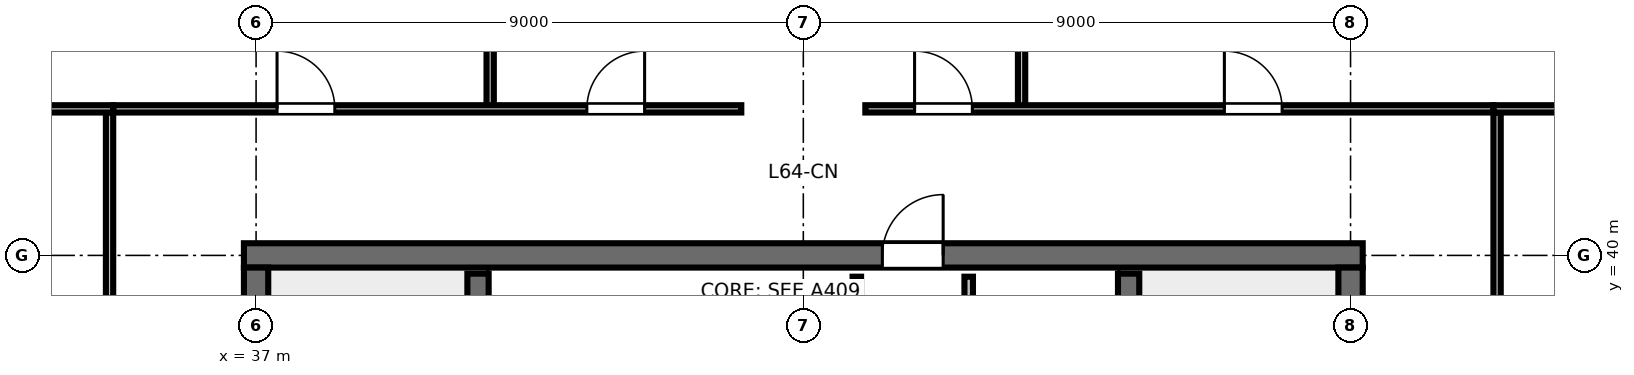
"""IFC4 building model, lengths in metres.
Left out: names, types, materials, properties, quantities, classifications, styles, units other than length and angle.
Written with IfcOpenShell. Run it as: python <this file> out.ifc"""

import sys

from ifc_helpers import new_model, si_unit, direction, frame, frame_2d, origin, place, context, subcontext, project, spatial, rectangle, extrude, element, fill, save


model = new_model("IFC4")
c1 = context("Model", 3, precision=1e-05, world=origin(), true_north=direction((0.0, 1.0)))
c2 = subcontext(c1, "Body", "Model", "MODEL_VIEW")
j1 = project(units=[si_unit("LENGTHUNIT", "METRE"), si_unit("PLANEANGLEUNIT", "RADIAN")], contexts=[c1])
p1 = place(None, origin())
s1 = spatial("IfcSite", under=j1, at=p1, CompositionType="ELEMENT")
p2 = place(p1, origin())
s2 = spatial("IfcBuilding", under=s1, at=p2, CompositionType="ELEMENT")
p3 = place(p2, frame((0.0, 0.0, 243.0)))
s3 = spatial("IfcBuildingStorey", under=s2, at=p3, CompositionType="ELEMENT", Elevation=243.0)
p4 = place(p3, frame((36.8, 40.0, 0.0), z_axis=(0.0, 0.0, 1.0), x_axis=(1.0, 0.0, 0.0)))
e1 = element("IfcWall", 1, at=p4, inside=s3, PredefinedType="SHEAR", context=c2, shape_type="SweptSolid", body=[
    extrude(rectangle(XDim=18.4, YDim=0.4, at=frame_2d((9.2, 0.0))), origin(), (0.0, 0.0, 1.0), 3.36),
])
p5 = place(p4, frame((10.5, 0.0, 0.0)))
e2 = element("IfcOpeningElement", 2, at=p5, cuts=e1, PredefinedType="OPENING", context=c2, shape_type="SweptSolid", body=[
    extrude(rectangle(XDim=1.0, YDim=2.15, at=frame_2d((0.5, 1.075))), frame((0.0, 0.21, 0.0), z_axis=(0.0, -1.0, 0.0), x_axis=(1.0, 0.0, 0.0)), (0.0, 0.0, 1.0), 0.42),
])
p6 = place(p3, frame((37.0, 24.2, 0.0), z_axis=(0.0, 0.0, 1.0), x_axis=(0.0, 1.0, 0.0)))
e3 = element("IfcWall", 3, at=p6, inside=s3, PredefinedType="SHEAR", context=c2, shape_type="SweptSolid", body=[
    extrude(rectangle(XDim=15.6, YDim=0.4, at=frame_2d((7.8, 0.0))), origin(), (0.0, 0.0, 1.0), 3.36),
])
p7 = place(p6, frame((5.325, 0.0, 0.0)))
e4 = element("IfcOpeningElement", 4, at=p7, cuts=e3, PredefinedType="OPENING", context=c2, shape_type="SweptSolid", body=[
    extrude(rectangle(XDim=1.15, YDim=2.15, at=frame_2d((0.575, 1.075))), frame((0.0, 0.21, 0.0), z_axis=(0.0, -1.0, 0.0), x_axis=(1.0, 0.0, 0.0)), (0.0, 0.0, 1.0), 0.42),
])
p8 = place(p3, frame((55.0, 24.2, 0.0), z_axis=(0.0, 0.0, 1.0), x_axis=(0.0, 1.0, 0.0)))
e5 = element("IfcWall", 5, at=p8, inside=s3, PredefinedType="SHEAR", context=c2, shape_type="SweptSolid", body=[
    extrude(rectangle(XDim=15.6, YDim=0.4, at=frame_2d((7.8, 0.0))), origin(), (0.0, 0.0, 1.0), 3.36),
])
p9 = place(p8, frame((5.325, 0.0, 0.0)))
e6 = element("IfcOpeningElement", 6, at=p9, cuts=e5, PredefinedType="OPENING", context=c2, shape_type="SweptSolid", body=[
    extrude(rectangle(XDim=1.15, YDim=2.15, at=frame_2d((0.575, 1.075))), frame((0.0, 0.21, 0.0), z_axis=(0.0, -1.0, 0.0), x_axis=(1.0, 0.0, 0.0)), (0.0, 0.0, 1.0), 0.42),
])
for number, where, z_axis, x_axis in (
    (7, (65.144, 41.854, 0.0), (0.0, 0.0, 1.0), (-0.707, 0.707, 0.0)),
    (8, (34.396, 49.394, 0.0), (0.0, 0.0, 1.0), (-0.707, -0.707, 0.0)),
):
    element("IfcWall", number, at=place(p3, frame(where, z_axis=z_axis, x_axis=x_axis)), inside=s3, PredefinedType="STANDARD", context=c2, shape_type="SweptSolid", body=[
        extrude(rectangle(XDim=10.662, YDim=0.265, at=frame_2d((5.331, 0.0))), origin(), (0.0, 0.0, 1.0), 3.375),
    ])
for number, where, z_axis, x_axis in (
    (9, (40.65, 32.0, 0.0), (0.0, 0.0, 1.0), (0.0, 1.0, 0.0)),
    (10, (51.35, 32.0, 0.0), (0.0, 0.0, 1.0), (0.0, 1.0, 0.0)),
):
    element("IfcWall", number, at=place(p3, frame(where, z_axis=z_axis, x_axis=x_axis)), inside=s3, PredefinedType="SHEAR", context=c2, shape_type="SweptSolid", body=[
        extrude(rectangle(XDim=7.7, YDim=0.35, at=frame_2d((3.85, 0.0))), origin(), (0.0, 0.0, 1.0), 3.6),
    ])
p10 = place(p3, frame((46.88, 32.05, 0.0), z_axis=(0.0, 0.0, 1.0), x_axis=(0.0, 1.0, 0.0)))
e11 = element("IfcWall", 11, at=p10, inside=s3, PredefinedType="PARTITIONING", context=c2, shape_type="SweptSolid", body=[
    extrude(rectangle(XDim=7.6, YDim=0.14, at=frame_2d((3.8, 0.0))), origin(), (0.0, 0.0, 1.0), 3.375),
])
p11 = place(p10, frame((3.4, 0.0, 0.0)))
e12 = element("IfcOpeningElement", 12, at=p11, cuts=e11, PredefinedType="OPENING", context=c2, shape_type="SweptSolid", body=[
    extrude(rectangle(XDim=0.95, YDim=2.15, at=frame_2d((0.475, 1.075))), frame((0.0, 0.08, 0.0), z_axis=(0.0, -1.0, 0.0), x_axis=(1.0, 0.0, 0.0)), (0.0, 0.0, 1.0), 0.16),
])
p12 = place(p3, frame((48.72, 32.05, 0.0), z_axis=(0.0, 0.0, 1.0), x_axis=(0.0, 1.0, 0.0)))
e13 = element("IfcWall", 13, at=p12, inside=s3, PredefinedType="PARTITIONING", context=c2, shape_type="SweptSolid", body=[
    extrude(rectangle(XDim=7.6, YDim=0.14, at=frame_2d((3.8, 0.0))), origin(), (0.0, 0.0, 1.0), 3.375),
])
p13 = place(p12, frame((0.8, 0.0, 0.0)))
e14 = element("IfcOpeningElement", 14, at=p13, cuts=e13, PredefinedType="OPENING", context=c2, shape_type="SweptSolid", body=[
    extrude(rectangle(XDim=0.9, YDim=2.15, at=frame_2d((0.45, 1.075))), frame((0.0, 0.08, 0.0), z_axis=(0.0, -1.0, 0.0), x_axis=(1.0, 0.0, 0.0)), (0.0, 0.0, 1.0), 0.16),
])
p14 = place(p12, frame((3.35, 0.0, 0.0)))
e15 = element("IfcOpeningElement", 15, at=p14, cuts=e13, PredefinedType="OPENING", context=c2, shape_type="SweptSolid", body=[
    extrude(rectangle(XDim=0.9, YDim=2.15, at=frame_2d((0.45, 1.075))), frame((0.0, 0.08, 0.0), z_axis=(0.0, -1.0, 0.0), x_axis=(1.0, 0.0, 0.0)), (0.0, 0.0, 1.0), 0.16),
])
p15 = place(p12, frame((5.9, 0.0, 0.0)))
e16 = element("IfcOpeningElement", 16, at=p15, cuts=e13, PredefinedType="OPENING", context=c2, shape_type="SweptSolid", body=[
    extrude(rectangle(XDim=0.92, YDim=2.15, at=frame_2d((0.46, 1.075))), frame((0.0, 0.08, 0.0), z_axis=(0.0, -1.0, 0.0), x_axis=(1.0, 0.0, 0.0)), (0.0, 0.0, 1.0), 0.16),
])
p16 = place(p3, frame((40.85, 42.41, 0.0), z_axis=(0.0, 0.0, 1.0), x_axis=(0.0, 1.0, 0.0)))
e17 = element("IfcWall", 17, at=p16, inside=s3, PredefinedType="PARTITIONING", context=c2, shape_type="SweptSolid", body=[
    extrude(rectangle(XDim=6.41, YDim=0.12, at=frame_2d((3.205, 0.0))), origin(), (0.0, 0.0, 1.0), 2.655),
])
p17 = place(p16, frame((1.4, 0.0, 0.0)))
e18 = element("IfcOpeningElement", 18, at=p17, cuts=e17, PredefinedType="OPENING", context=c2, shape_type="SweptSolid", body=[
    extrude(rectangle(XDim=0.9, YDim=2.15, at=frame_2d((0.45, 1.075))), frame((0.0, 0.07, 0.0), z_axis=(0.0, -1.0, 0.0), x_axis=(1.0, 0.0, 0.0)), (0.0, 0.0, 1.0), 0.14),
])
p18 = place(p3, frame((49.59, 42.41, 0.0), z_axis=(0.0, 0.0, 1.0), x_axis=(0.0, 1.0, 0.0)))
e19 = element("IfcWall", 19, at=p18, inside=s3, PredefinedType="PARTITIONING", context=c2, shape_type="SweptSolid", body=[
    extrude(rectangle(XDim=6.41, YDim=0.12, at=frame_2d((3.205, 0.0))), origin(), (0.0, 0.0, 1.0), 2.655),
])
p19 = place(p18, frame((1.4, 0.0, 0.0)))
e20 = element("IfcOpeningElement", 20, at=p19, cuts=e19, PredefinedType="OPENING", context=c2, shape_type="SweptSolid", body=[
    extrude(rectangle(XDim=0.9, YDim=2.15, at=frame_2d((0.45, 1.075))), frame((0.0, 0.07, 0.0), z_axis=(0.0, -1.0, 0.0), x_axis=(1.0, 0.0, 0.0)), (0.0, 0.0, 1.0), 0.14),
])
p20 = place(p3, frame((34.65, 42.41, 0.0), z_axis=(0.0, 0.0, 1.0), x_axis=(1.0, 0.0, 0.0)))
e21 = element("IfcWall", 21, at=p20, inside=s3, PredefinedType="PARTITIONING", context=c2, shape_type="SweptSolid", body=[
    extrude(rectangle(XDim=10.33, YDim=0.12, at=frame_2d((5.165, 0.0))), origin(), (0.0, 0.0, 1.0), 2.655),
])
p21 = place(p20, frame((2.695, 0.0, 0.0)))
e22 = element("IfcOpeningElement", 22, at=p21, cuts=e21, PredefinedType="OPENING", context=c2, shape_type="SweptSolid", body=[
    extrude(rectangle(XDim=0.95, YDim=2.15, at=frame_2d((0.475, 1.075))), frame((0.0, 0.07, 0.0), z_axis=(0.0, -1.0, 0.0), x_axis=(1.0, 0.0, 0.0)), (0.0, 0.0, 1.0), 0.14),
])
p22 = place(p20, frame((7.79, 0.0, 0.0)))
e23 = element("IfcOpeningElement", 23, at=p22, cuts=e21, PredefinedType="OPENING", context=c2, shape_type="SweptSolid", body=[
    extrude(rectangle(XDim=0.95, YDim=2.15, at=frame_2d((0.475, 1.075))), frame((0.0, 0.07, 0.0), z_axis=(0.0, -1.0, 0.0), x_axis=(1.0, 0.0, 0.0)), (0.0, 0.0, 1.0), 0.14),
])
p23 = place(p3, frame((47.02, 42.41, 0.0), z_axis=(0.0, 0.0, 1.0), x_axis=(1.0, 0.0, 0.0)))
e24 = element("IfcWall", 24, at=p23, inside=s3, PredefinedType="PARTITIONING", context=c2, shape_type="SweptSolid", body=[
    extrude(rectangle(XDim=10.33, YDim=0.12, at=frame_2d((5.165, 0.0))), origin(), (0.0, 0.0, 1.0), 2.655),
])
p24 = place(p23, frame((0.81, 0.0, 0.0)))
e25 = element("IfcOpeningElement", 25, at=p24, cuts=e24, PredefinedType="OPENING", context=c2, shape_type="SweptSolid", body=[
    extrude(rectangle(XDim=0.95, YDim=2.15, at=frame_2d((0.475, 1.075))), frame((0.0, 0.07, 0.0), z_axis=(0.0, -1.0, 0.0), x_axis=(1.0, 0.0, 0.0)), (0.0, 0.0, 1.0), 0.14),
])
p25 = place(p23, frame((5.905, 0.0, 0.0)))
e26 = element("IfcOpeningElement", 26, at=p25, cuts=e24, PredefinedType="OPENING", context=c2, shape_type="SweptSolid", body=[
    extrude(rectangle(XDim=0.95, YDim=2.15, at=frame_2d((0.475, 1.075))), frame((0.0, 0.07, 0.0), z_axis=(0.0, -1.0, 0.0), x_axis=(1.0, 0.0, 0.0)), (0.0, 0.0, 1.0), 0.14),
])
p26 = place(p3, frame((34.59, 21.65, 0.0), z_axis=(0.0, 0.0, 1.0), x_axis=(0.0, 1.0, 0.0)))
e27 = element("IfcWall", 27, at=p26, inside=s3, PredefinedType="PARTITIONING", context=c2, shape_type="SweptSolid", body=[
    extrude(rectangle(XDim=20.7, YDim=0.12, at=frame_2d((10.35, 0.0))), origin(), (0.0, 0.0, 1.0), 2.655),
])
p27 = place(p26, frame((4.26, 0.0, 0.0)))
e28 = element("IfcOpeningElement", 28, at=p27, cuts=e27, PredefinedType="OPENING", context=c2, shape_type="SweptSolid", body=[
    extrude(rectangle(XDim=0.95, YDim=2.15, at=frame_2d((0.475, 1.075))), frame((0.0, 0.07, 0.0), z_axis=(0.0, -1.0, 0.0), x_axis=(1.0, 0.0, 0.0)), (0.0, 0.0, 1.0), 0.14),
])
p28 = place(p26, frame((14.411, 0.0, 0.0)))
e29 = element("IfcOpeningElement", 29, at=p28, cuts=e27, PredefinedType="OPENING", context=c2, shape_type="SweptSolid", body=[
    extrude(rectangle(XDim=0.95, YDim=2.15, at=frame_2d((0.475, 1.075))), frame((0.0, 0.07, 0.0), z_axis=(0.0, -1.0, 0.0), x_axis=(1.0, 0.0, 0.0)), (0.0, 0.0, 1.0), 0.14),
])
p29 = place(p3, frame((57.41, 21.65, 0.0), z_axis=(0.0, 0.0, 1.0), x_axis=(0.0, 1.0, 0.0)))
e30 = element("IfcWall", 30, at=p29, inside=s3, PredefinedType="PARTITIONING", context=c2, shape_type="SweptSolid", body=[
    extrude(rectangle(XDim=20.7, YDim=0.12, at=frame_2d((10.35, 0.0))), origin(), (0.0, 0.0, 1.0), 2.655),
])
p30 = place(p29, frame((9.875, 0.0, 0.0)))
e31 = element("IfcOpeningElement", 31, at=p30, cuts=e30, PredefinedType="OPENING", context=c2, shape_type="SweptSolid", body=[
    extrude(rectangle(XDim=0.95, YDim=2.15, at=frame_2d((0.475, 1.075))), frame((0.0, 0.07, 0.0), z_axis=(0.0, -1.0, 0.0), x_axis=(1.0, 0.0, 0.0)), (0.0, 0.0, 1.0), 0.14),
])
for number, where, z_axis, x_axis in (
    (32, (34.65, 42.41, 0.0), (0.0, 0.0, 1.0), (-1.0, 0.0, 0.0)),
    (33, (57.35, 42.41, 0.0), (0.0, 0.0, 1.0), (1.0, 0.0, 0.0)),
):
    element("IfcWall", number, at=place(p3, frame(where, z_axis=z_axis, x_axis=x_axis)), inside=s3, PredefinedType="PARTITIONING", context=c2, shape_type="SweptSolid", body=[
        extrude(rectangle(XDim=7.22, YDim=0.12, at=frame_2d((3.61, 0.0))), origin(), (0.0, 0.0, 1.0), 2.655),
    ])
p31 = place(p5, origin())
e34 = element("IfcDoor", 34, at=p31, inside=s3, OperationType="SINGLE_SWING_RIGHT", PredefinedType="DOOR", context=c2, shape_type="SweptSolid", body=[
    extrude(rectangle(XDim=1.0, YDim=2.15, at=frame_2d((0.5, 1.075))), frame((0.0, 0.025, 0.0), z_axis=(0.0, -1.0, 0.0), x_axis=(1.0, 0.0, 0.0)), (0.0, 0.0, 1.0), 0.05),
])
fill(e2, e34)
p32 = place(p21, origin())
e35 = element("IfcDoor", 35, at=p32, inside=s3, OperationType="SINGLE_SWING_LEFT", PredefinedType="DOOR", context=c2, shape_type="SweptSolid", body=[
    extrude(rectangle(XDim=0.95, YDim=2.15, at=frame_2d((0.475, 1.075))), frame((0.0, 0.025, 0.0), z_axis=(0.0, -1.0, 0.0), x_axis=(1.0, 0.0, 0.0)), (0.0, 0.0, 1.0), 0.05),
])
fill(e22, e35)
p33 = place(p22, origin())
e36 = element("IfcDoor", 36, at=p33, inside=s3, OperationType="SINGLE_SWING_RIGHT", PredefinedType="DOOR", context=c2, shape_type="SweptSolid", body=[
    extrude(rectangle(XDim=0.95, YDim=2.15, at=frame_2d((0.475, 1.075))), frame((0.0, 0.025, 0.0), z_axis=(0.0, -1.0, 0.0), x_axis=(1.0, 0.0, 0.0)), (0.0, 0.0, 1.0), 0.05),
])
fill(e23, e36)
p34 = place(p24, origin())
e37 = element("IfcDoor", 37, at=p34, inside=s3, OperationType="SINGLE_SWING_LEFT", PredefinedType="DOOR", context=c2, shape_type="SweptSolid", body=[
    extrude(rectangle(XDim=0.95, YDim=2.15, at=frame_2d((0.475, 1.075))), frame((0.0, 0.025, 0.0), z_axis=(0.0, -1.0, 0.0), x_axis=(1.0, 0.0, 0.0)), (0.0, 0.0, 1.0), 0.05),
])
fill(e25, e37)
p35 = place(p25, origin())
e38 = element("IfcDoor", 38, at=p35, inside=s3, OperationType="SINGLE_SWING_LEFT", PredefinedType="DOOR", context=c2, shape_type="SweptSolid", body=[
    extrude(rectangle(XDim=0.95, YDim=2.15, at=frame_2d((0.475, 1.075))), frame((0.0, 0.025, 0.0), z_axis=(0.0, -1.0, 0.0), x_axis=(1.0, 0.0, 0.0)), (0.0, 0.0, 1.0), 0.05),
])
fill(e26, e38)
save(model, sys.argv[1])
